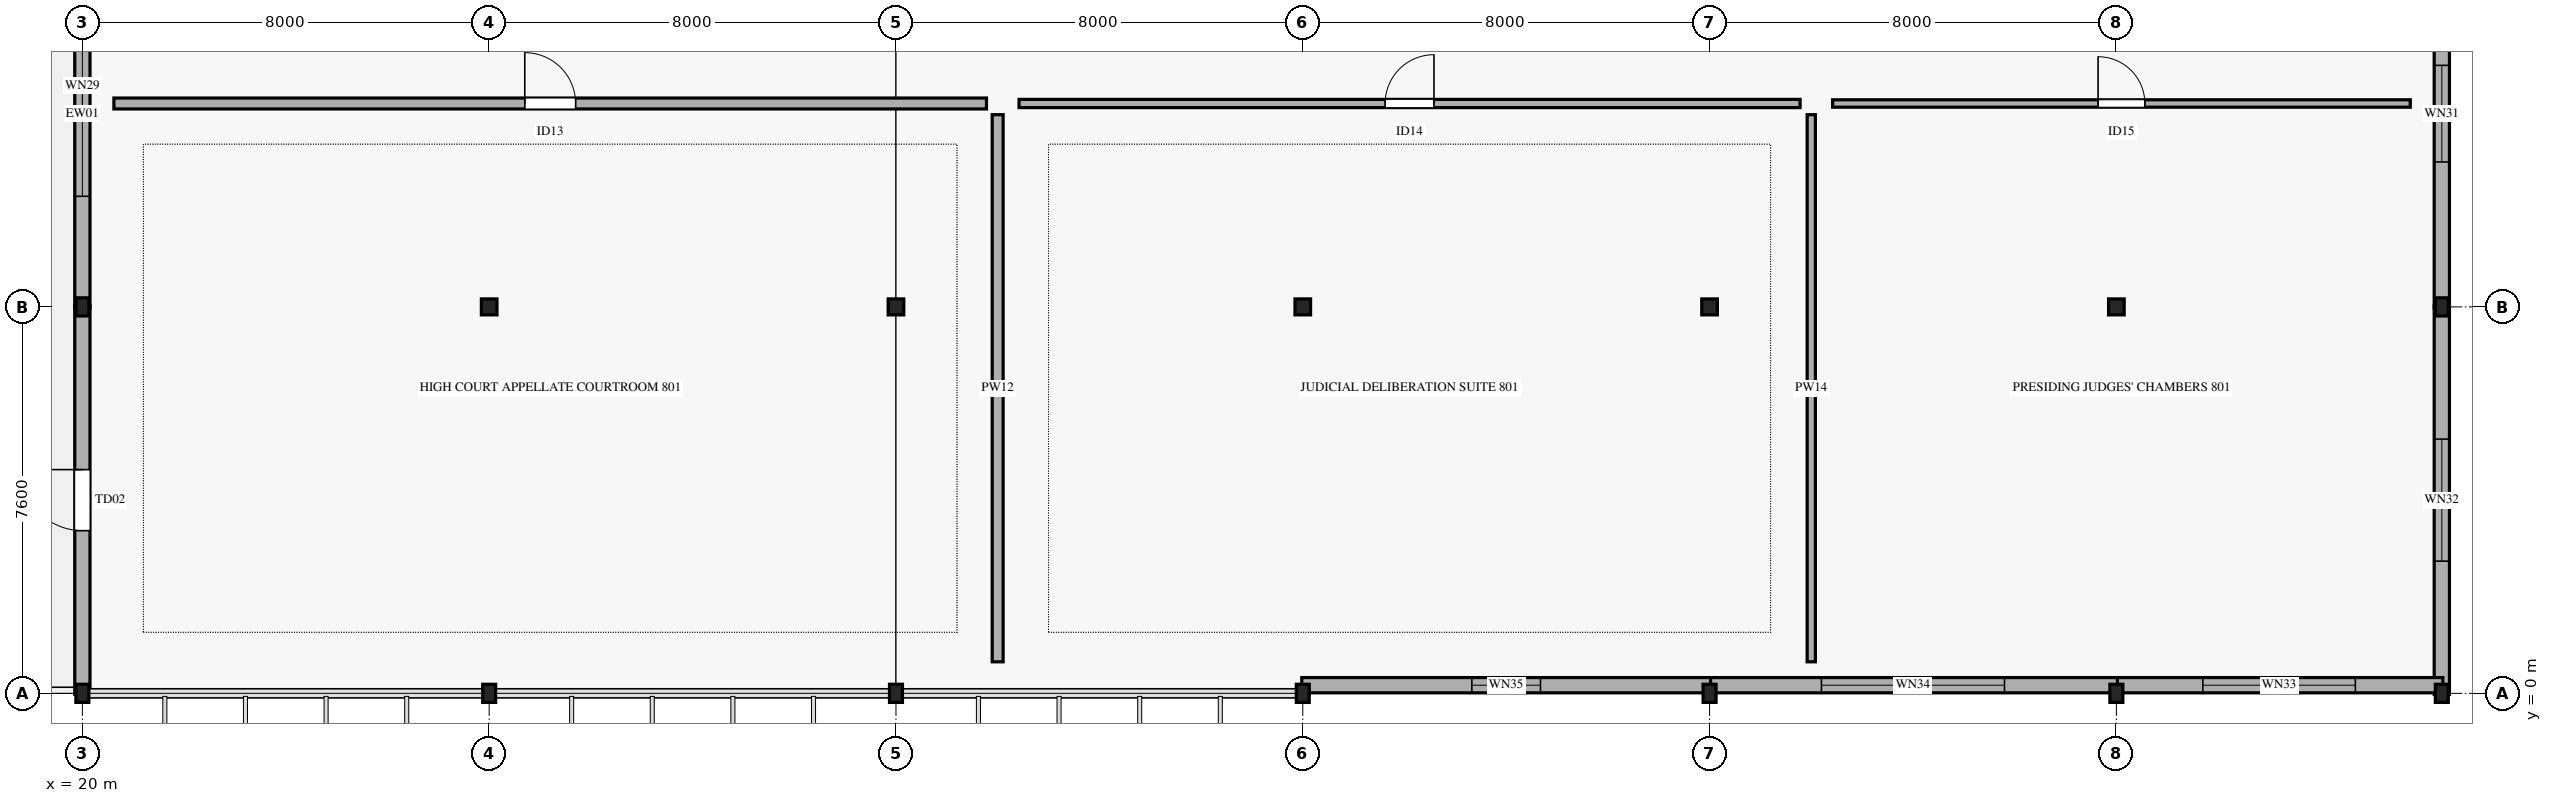
"""IFC4 building model, lengths in metres.
Left out: names, types, materials, properties, quantities, classifications, styles, units other than length and angle.
Written with IfcOpenShell. Run it as: python <this file> out.ifc"""

import sys

from ifc_helpers import new_model, si_unit, direction, frame, frame_2d, origin, origin_2d, place, context, subcontext, project, spatial, rectangle, i_section, extrude, element, fill, save


model = new_model("IFC4")
c1 = context("Model", 3, precision=1e-05, world=origin(), true_north=direction((0.0, 1.0)))
c2 = subcontext(c1, "Body", "Model", "MODEL_VIEW")
j1 = project(units=[si_unit("LENGTHUNIT", "METRE"), si_unit("PLANEANGLEUNIT", "RADIAN")], contexts=[c1])
p1 = place(None, origin())
s1 = spatial("IfcSite", under=j1, at=p1, CompositionType="ELEMENT")
p2 = place(p1, origin())
s2 = spatial("IfcBuilding", under=s1, at=p2, CompositionType="ELEMENT")
p3 = place(p2, frame((0.0, 0.0, 37.8)))
s3 = spatial("IfcBuildingStorey", under=s2, at=p3, CompositionType="ELEMENT", Elevation=37.8)
for number, where, z_axis, x_axis in (
    (1, (20.0, 0.0, 0.0), (0.0, 0.0, 1.0), (1.0, 0.0, 0.0)),
    (2, (20.0, 7.6, 0.0), (0.0, 0.0, 1.0), (1.0, 0.0, 0.0)),
    (3, (28.0, 0.0, 0.0), (0.0, 0.0, 1.0), (1.0, 0.0, 0.0)),
):
    element("IfcColumn", number, at=place(p3, frame(where, z_axis=z_axis, x_axis=x_axis)), inside=s3, PredefinedType="COLUMN", context=c2, shape_type="SweptSolid", body=[
        extrude(i_section(OverallWidth=0.255, OverallDepth=0.357, WebThickness=0.01, FlangeThickness=0.018, FilletRadius=0.015, at=origin_2d()), origin(), (0.0, 0.0, 1.0), 4.0),
    ])
p4 = place(p3, frame((28.0, 7.6, 0.0), z_axis=(0.0, 0.0, 1.0), x_axis=(1.0, 0.0, 0.0)))
e4 = element("IfcColumn", 4, at=p4, inside=s3, PredefinedType="COLUMN", context=c2, shape_type="SweptSolid", body=[
    extrude(i_section(OverallWidth=0.307, OverallDepth=0.314, WebThickness=0.012, FlangeThickness=0.019, FilletRadius=0.015, at=origin_2d()), origin(), (0.0, 0.0, 1.0), 4.0),
])
p5 = place(p3, frame((36.0, 0.0, 0.0), z_axis=(0.0, 0.0, 1.0), x_axis=(1.0, 0.0, 0.0)))
e5 = element("IfcColumn", 5, at=p5, inside=s3, PredefinedType="COLUMN", context=c2, shape_type="SweptSolid", body=[
    extrude(i_section(OverallWidth=0.255, OverallDepth=0.357, WebThickness=0.01, FlangeThickness=0.018, FilletRadius=0.015, at=origin_2d()), origin(), (0.0, 0.0, 1.0), 4.0),
])
p6 = place(p3, frame((36.0, 7.6, 0.0), z_axis=(0.0, 0.0, 1.0), x_axis=(1.0, 0.0, 0.0)))
e6 = element("IfcColumn", 6, at=p6, inside=s3, PredefinedType="COLUMN", context=c2, shape_type="SweptSolid", body=[
    extrude(i_section(OverallWidth=0.307, OverallDepth=0.314, WebThickness=0.012, FlangeThickness=0.019, FilletRadius=0.015, at=origin_2d()), origin(), (0.0, 0.0, 1.0), 4.0),
])
p7 = place(p3, frame((44.0, 0.0, 0.0), z_axis=(0.0, 0.0, 1.0), x_axis=(1.0, 0.0, 0.0)))
e7 = element("IfcColumn", 7, at=p7, inside=s3, PredefinedType="COLUMN", context=c2, shape_type="SweptSolid", body=[
    extrude(i_section(OverallWidth=0.255, OverallDepth=0.357, WebThickness=0.01, FlangeThickness=0.018, FilletRadius=0.015, at=origin_2d()), origin(), (0.0, 0.0, 1.0), 4.0),
])
p8 = place(p3, frame((44.0, 7.6, 0.0), z_axis=(0.0, 0.0, 1.0), x_axis=(1.0, 0.0, 0.0)))
e8 = element("IfcColumn", 8, at=p8, inside=s3, PredefinedType="COLUMN", context=c2, shape_type="SweptSolid", body=[
    extrude(i_section(OverallWidth=0.307, OverallDepth=0.314, WebThickness=0.012, FlangeThickness=0.019, FilletRadius=0.015, at=origin_2d()), origin(), (0.0, 0.0, 1.0), 4.0),
])
p9 = place(p3, frame((52.0, 0.0, 0.0), z_axis=(0.0, 0.0, 1.0), x_axis=(1.0, 0.0, 0.0)))
e9 = element("IfcColumn", 9, at=p9, inside=s3, PredefinedType="COLUMN", context=c2, shape_type="SweptSolid", body=[
    extrude(i_section(OverallWidth=0.255, OverallDepth=0.357, WebThickness=0.01, FlangeThickness=0.018, FilletRadius=0.015, at=origin_2d()), origin(), (0.0, 0.0, 1.0), 4.0),
])
p10 = place(p3, frame((52.0, 7.6, 0.0), z_axis=(0.0, 0.0, 1.0), x_axis=(1.0, 0.0, 0.0)))
e10 = element("IfcColumn", 10, at=p10, inside=s3, PredefinedType="COLUMN", context=c2, shape_type="SweptSolid", body=[
    extrude(i_section(OverallWidth=0.307, OverallDepth=0.314, WebThickness=0.012, FlangeThickness=0.019, FilletRadius=0.015, at=origin_2d()), origin(), (0.0, 0.0, 1.0), 4.0),
])
p11 = place(p3, frame((60.0, 0.0, 0.0), z_axis=(0.0, 0.0, 1.0), x_axis=(1.0, 0.0, 0.0)))
e11 = element("IfcColumn", 11, at=p11, inside=s3, PredefinedType="COLUMN", context=c2, shape_type="SweptSolid", body=[
    extrude(i_section(OverallWidth=0.255, OverallDepth=0.357, WebThickness=0.01, FlangeThickness=0.018, FilletRadius=0.015, at=origin_2d()), origin(), (0.0, 0.0, 1.0), 4.0),
])
p12 = place(p3, frame((60.0, 7.6, 0.0), z_axis=(0.0, 0.0, 1.0), x_axis=(1.0, 0.0, 0.0)))
e12 = element("IfcColumn", 12, at=p12, inside=s3, PredefinedType="COLUMN", context=c2, shape_type="SweptSolid", body=[
    extrude(i_section(OverallWidth=0.307, OverallDepth=0.314, WebThickness=0.012, FlangeThickness=0.019, FilletRadius=0.015, at=origin_2d()), origin(), (0.0, 0.0, 1.0), 4.0),
])
for number, where, z_axis, x_axis in (
    (13, (66.4, 0.0, 0.0), (0.0, 0.0, 1.0), (1.0, 0.0, 0.0)),
    (14, (66.4, 7.6, 0.0), (0.0, 0.0, 1.0), (1.0, 0.0, 0.0)),
):
    element("IfcColumn", number, at=place(p3, frame(where, z_axis=z_axis, x_axis=x_axis)), inside=s3, PredefinedType="COLUMN", context=c2, shape_type="SweptSolid", body=[
        extrude(i_section(OverallWidth=0.255, OverallDepth=0.357, WebThickness=0.01, FlangeThickness=0.018, FilletRadius=0.015, at=origin_2d()), origin(), (0.0, 0.0, 1.0), 4.0),
    ])
p13 = place(p3, frame((20.0, -0.02, 0.0), z_axis=(0.0, 0.0, 1.0), x_axis=(0.0, 1.0, 0.0)))
e15 = element("IfcWall", 15, at=p13, inside=s3, PredefinedType="STANDARD", context=c2, shape_type="SweptSolid", body=[
    extrude(rectangle(XDim=7.64, YDim=0.3, at=frame_2d((3.82, 0.0))), origin(), (0.0, 0.0, 1.0), 3.06),
])
p14 = place(p13, frame((3.22, 0.0, 0.0)))
e16 = element("IfcOpeningElement", 16, at=p14, cuts=e15, PredefinedType="OPENING", context=c2, shape_type="SweptSolid", body=[
    extrude(rectangle(XDim=1.2, YDim=2.2, at=frame_2d((0.6, 1.1))), frame((0.0, 0.16, 0.0), z_axis=(0.0, -1.0, 0.0), x_axis=(1.0, 0.0, 0.0)), (0.0, 0.0, 1.0), 0.32),
])
p15 = place(p3, frame((20.0, 7.58, 0.0), z_axis=(0.0, 0.0, 1.0), x_axis=(0.0, 1.0, 0.0)))
e17 = element("IfcWall", 17, at=p15, inside=s3, PredefinedType="STANDARD", context=c2, shape_type="SweptSolid", body=[
    extrude(rectangle(XDim=7.64, YDim=0.3, at=frame_2d((3.82, 0.0))), origin(), (0.0, 0.0, 1.0), 3.06),
])
p16 = place(p15, frame((2.195, 0.0, 0.75)))
e18 = element("IfcOpeningElement", 18, at=p16, cuts=e17, PredefinedType="OPENING", context=c2, shape_type="SweptSolid", body=[
    extrude(rectangle(XDim=3.25, YDim=1.55, at=frame_2d((1.625, 0.775))), frame((0.0, 0.16, 0.0), z_axis=(0.0, -1.0, 0.0), x_axis=(1.0, 0.0, 0.0)), (0.0, 0.0, 1.0), 0.32),
])
p17 = place(p3, frame((66.4, 15.22, 0.0), z_axis=(0.0, 0.0, 1.0), x_axis=(0.0, -1.0, 0.0)))
e19 = element("IfcWall", 19, at=p17, inside=s3, PredefinedType="STANDARD", context=c2, shape_type="SweptSolid", body=[
    extrude(rectangle(XDim=7.64, YDim=0.3, at=frame_2d((3.82, 0.0))), origin(), (0.0, 0.0, 1.0), 3.06),
])
p18 = place(p17, frame((2.87, 0.0, 0.75)))
e20 = element("IfcOpeningElement", 20, at=p18, cuts=e19, PredefinedType="OPENING", context=c2, shape_type="SweptSolid", body=[
    extrude(rectangle(XDim=1.9, YDim=1.3, at=frame_2d((0.95, 0.65))), frame((0.0, 0.16, 0.0), z_axis=(0.0, -1.0, 0.0), x_axis=(1.0, 0.0, 0.0)), (0.0, 0.0, 1.0), 0.32),
])
p19 = place(p3, frame((66.4, 7.62, 0.0), z_axis=(0.0, 0.0, 1.0), x_axis=(0.0, -1.0, 0.0)))
e21 = element("IfcWall", 21, at=p19, inside=s3, PredefinedType="STANDARD", context=c2, shape_type="SweptSolid", body=[
    extrude(rectangle(XDim=7.64, YDim=0.3, at=frame_2d((3.82, 0.0))), origin(), (0.0, 0.0, 1.0), 3.06),
])
p20 = place(p19, frame((2.62, 0.0, 0.75)))
e22 = element("IfcOpeningElement", 22, at=p20, cuts=e21, PredefinedType="OPENING", context=c2, shape_type="SweptSolid", body=[
    extrude(rectangle(XDim=2.4, YDim=1.3, at=frame_2d((1.2, 0.65))), frame((0.0, 0.16, 0.0), z_axis=(0.0, -1.0, 0.0), x_axis=(1.0, 0.0, 0.0)), (0.0, 0.0, 1.0), 0.32),
])
p21 = place(p3, frame((66.42, 0.16, 0.0), z_axis=(0.0, 0.0, 1.0), x_axis=(-1.0, 0.0, 0.0)))
e23 = element("IfcWall", 23, at=p21, inside=s3, PredefinedType="STANDARD", context=c2, shape_type="SweptSolid", body=[
    extrude(rectangle(XDim=6.44, YDim=0.3, at=frame_2d((3.22, 0.0))), origin(), (0.0, 0.0, 1.0), 3.06),
])
p22 = place(p21, frame((1.72, 0.0, 0.75)))
e24 = element("IfcOpeningElement", 24, at=p22, cuts=e23, PredefinedType="OPENING", context=c2, shape_type="SweptSolid", body=[
    extrude(rectangle(XDim=3.0, YDim=1.3, at=frame_2d((1.5, 0.65))), frame((0.0, 0.16, 0.0), z_axis=(0.0, -1.0, 0.0), x_axis=(1.0, 0.0, 0.0)), (0.0, 0.0, 1.0), 0.32),
])
p23 = place(p3, frame((60.02, 0.16, 0.0), z_axis=(0.0, 0.0, 1.0), x_axis=(-1.0, 0.0, 0.0)))
e25 = element("IfcWall", 25, at=p23, inside=s3, PredefinedType="STANDARD", context=c2, shape_type="SweptSolid", body=[
    extrude(rectangle(XDim=8.04, YDim=0.3, at=frame_2d((4.02, 0.0))), origin(), (0.0, 0.0, 1.0), 3.06),
])
p24 = place(p23, frame((2.22, 0.0, 0.75)))
e26 = element("IfcOpeningElement", 26, at=p24, cuts=e25, PredefinedType="OPENING", context=c2, shape_type="SweptSolid", body=[
    extrude(rectangle(XDim=3.6, YDim=1.3, at=frame_2d((1.8, 0.65))), frame((0.0, 0.16, 0.0), z_axis=(0.0, -1.0, 0.0), x_axis=(1.0, 0.0, 0.0)), (0.0, 0.0, 1.0), 0.32),
])
p25 = place(p3, frame((52.02, 0.16, 0.0), z_axis=(0.0, 0.0, 1.0), x_axis=(-1.0, 0.0, 0.0)))
e27 = element("IfcWall", 27, at=p25, inside=s3, PredefinedType="STANDARD", context=c2, shape_type="SweptSolid", body=[
    extrude(rectangle(XDim=8.04, YDim=0.3, at=frame_2d((4.02, 0.0))), origin(), (0.0, 0.0, 1.0), 3.06),
])
p26 = place(p25, frame((3.345, 0.0, 0.75)))
e28 = element("IfcOpeningElement", 28, at=p26, cuts=e27, PredefinedType="OPENING", context=c2, shape_type="SweptSolid", body=[
    extrude(rectangle(XDim=1.35, YDim=1.9, at=frame_2d((0.675, 0.95))), frame((0.0, 0.16, 0.0), z_axis=(0.0, -1.0, 0.0), x_axis=(1.0, 0.0, 0.0)), (0.0, 0.0, 1.0), 0.32),
])
p27 = place(p3, frame((20.62, 11.6, 0.0), z_axis=(0.0, 0.0, 1.0), x_axis=(1.0, 0.0, 0.0)))
e29 = element("IfcWall", 29, at=p27, inside=s3, PredefinedType="PARTITIONING", context=c2, shape_type="SweptSolid", body=[
    extrude(rectangle(XDim=17.16, YDim=0.215, at=frame_2d((8.58, 0.0))), origin(), (0.0, 0.0, 1.0), 2.85),
])
p28 = place(p27, frame((8.08, 0.0, 0.0)))
e30 = element("IfcOpeningElement", 30, at=p28, cuts=e29, PredefinedType="OPENING", context=c2, shape_type="SweptSolid", body=[
    extrude(rectangle(XDim=1.0, YDim=2.3, at=frame_2d((0.5, 1.15))), frame((0.0, 0.117, 0.0), z_axis=(0.0, -1.0, 0.0), x_axis=(1.0, 0.0, 0.0)), (0.0, 0.0, 1.0), 0.235),
])
p29 = place(p3, frame((38.0, 0.62, 0.0), z_axis=(0.0, 0.0, 1.0), x_axis=(0.0, 1.0, 0.0)))
e31 = element("IfcWall", 31, at=p29, inside=s3, PredefinedType="PARTITIONING", context=c2, shape_type="SweptSolid", body=[
    extrude(rectangle(XDim=10.76, YDim=0.215, at=frame_2d((5.38, 0.0))), origin(), (0.0, 0.0, 1.0), 2.85),
])
p30 = place(p3, frame((38.42, 11.6, 0.0), z_axis=(0.0, 0.0, 1.0), x_axis=(1.0, 0.0, 0.0)))
e32 = element("IfcWall", 32, at=p30, inside=s3, PredefinedType="PARTITIONING", context=c2, shape_type="SweptSolid", body=[
    extrude(rectangle(XDim=15.36, YDim=0.162, at=frame_2d((7.68, 0.0))), origin(), (0.0, 0.0, 1.0), 2.85),
])
p31 = place(p30, frame((7.2, 0.0, 0.0)))
e33 = element("IfcOpeningElement", 33, at=p31, cuts=e32, PredefinedType="OPENING", context=c2, shape_type="SweptSolid", body=[
    extrude(rectangle(XDim=0.96, YDim=2.25, at=frame_2d((0.48, 1.125))), frame((0.0, 0.091, 0.0), z_axis=(0.0, -1.0, 0.0), x_axis=(1.0, 0.0, 0.0)), (0.0, 0.0, 1.0), 0.182),
])
p32 = place(p3, frame((54.0, 0.62, 0.0), z_axis=(0.0, 0.0, 1.0), x_axis=(0.0, 1.0, 0.0)))
e34 = element("IfcWall", 34, at=p32, inside=s3, PredefinedType="PARTITIONING", context=c2, shape_type="SweptSolid", body=[
    extrude(rectangle(XDim=10.76, YDim=0.162, at=frame_2d((5.38, 0.0))), origin(), (0.0, 0.0, 1.0), 2.85),
])
p33 = place(p3, frame((54.42, 11.6, 0.0), z_axis=(0.0, 0.0, 1.0), x_axis=(1.0, 0.0, 0.0)))
e35 = element("IfcWall", 35, at=p33, inside=s3, PredefinedType="PARTITIONING", context=c2, shape_type="SweptSolid", body=[
    extrude(rectangle(XDim=11.36, YDim=0.146, at=frame_2d((5.68, 0.0))), origin(), (0.0, 0.0, 1.0), 2.85),
])
p34 = place(p33, frame((5.22, 0.0, 0.0)))
e36 = element("IfcOpeningElement", 36, at=p34, cuts=e35, PredefinedType="OPENING", context=c2, shape_type="SweptSolid", body=[
    extrude(rectangle(XDim=0.92, YDim=2.2, at=frame_2d((0.46, 1.1))), frame((0.0, 0.083, 0.0), z_axis=(0.0, -1.0, 0.0), x_axis=(1.0, 0.0, 0.0)), (0.0, 0.0, 1.0), 0.166),
])
p35 = place(p14, origin())
e37 = element("IfcDoor", 37, at=p35, inside=s3, OperationType="SINGLE_SWING_RIGHT", PredefinedType="DOOR", context=c2, shape_type="SweptSolid", body=[
    extrude(rectangle(XDim=1.2, YDim=2.2, at=frame_2d((0.6, 1.1))), frame((0.0, 0.025, 0.0), z_axis=(0.0, -1.0, 0.0), x_axis=(1.0, 0.0, 0.0)), (0.0, 0.0, 1.0), 0.05),
])
fill(e16, e37)
p36 = place(p16, origin())
e38 = element("IfcWindow", 38, at=p36, inside=s3, PartitioningType="SINGLE_PANEL", PredefinedType="WINDOW", context=c2, shape_type="SweptSolid", body=[
    extrude(rectangle(XDim=3.25, YDim=1.55, at=frame_2d((1.625, 0.775))), frame((0.0, 0.03, 0.0), z_axis=(0.0, -1.0, 0.0), x_axis=(1.0, 0.0, 0.0)), (0.0, 0.0, 1.0), 0.06),
])
fill(e18, e38)
p37 = place(p18, origin())
e39 = element("IfcWindow", 39, at=p37, inside=s3, PartitioningType="SINGLE_PANEL", PredefinedType="WINDOW", context=c2, shape_type="SweptSolid", body=[
    extrude(rectangle(XDim=1.9, YDim=1.3, at=frame_2d((0.95, 0.65))), frame((0.0, 0.03, 0.0), z_axis=(0.0, -1.0, 0.0), x_axis=(1.0, 0.0, 0.0)), (0.0, 0.0, 1.0), 0.06),
])
fill(e20, e39)
p38 = place(p20, origin())
e40 = element("IfcWindow", 40, at=p38, inside=s3, PartitioningType="SINGLE_PANEL", PredefinedType="WINDOW", context=c2, shape_type="SweptSolid", body=[
    extrude(rectangle(XDim=2.4, YDim=1.3, at=frame_2d((1.2, 0.65))), frame((0.0, 0.03, 0.0), z_axis=(0.0, -1.0, 0.0), x_axis=(1.0, 0.0, 0.0)), (0.0, 0.0, 1.0), 0.06),
])
fill(e22, e40)
p39 = place(p22, origin())
e41 = element("IfcWindow", 41, at=p39, inside=s3, PartitioningType="SINGLE_PANEL", PredefinedType="WINDOW", context=c2, shape_type="SweptSolid", body=[
    extrude(rectangle(XDim=3.0, YDim=1.3, at=frame_2d((1.5, 0.65))), frame((0.0, 0.03, 0.0), z_axis=(0.0, -1.0, 0.0), x_axis=(1.0, 0.0, 0.0)), (0.0, 0.0, 1.0), 0.06),
])
fill(e24, e41)
p40 = place(p24, origin())
e42 = element("IfcWindow", 42, at=p40, inside=s3, PartitioningType="SINGLE_PANEL", PredefinedType="WINDOW", context=c2, shape_type="SweptSolid", body=[
    extrude(rectangle(XDim=3.6, YDim=1.3, at=frame_2d((1.8, 0.65))), frame((0.0, 0.03, 0.0), z_axis=(0.0, -1.0, 0.0), x_axis=(1.0, 0.0, 0.0)), (0.0, 0.0, 1.0), 0.06),
])
fill(e26, e42)
p41 = place(p26, origin())
e43 = element("IfcWindow", 43, at=p41, inside=s3, PartitioningType="SINGLE_PANEL", PredefinedType="WINDOW", context=c2, shape_type="SweptSolid", body=[
    extrude(rectangle(XDim=1.35, YDim=1.9, at=frame_2d((0.675, 0.95))), frame((0.0, 0.03, 0.0), z_axis=(0.0, -1.0, 0.0), x_axis=(1.0, 0.0, 0.0)), (0.0, 0.0, 1.0), 0.06),
])
fill(e28, e43)
p42 = place(p28, origin())
e44 = element("IfcDoor", 44, at=p42, inside=s3, OperationType="SINGLE_SWING_LEFT", PredefinedType="DOOR", context=c2, shape_type="SweptSolid", body=[
    extrude(rectangle(XDim=1.0, YDim=2.3, at=frame_2d((0.5, 1.15))), frame((0.0, 0.025, 0.0), z_axis=(0.0, -1.0, 0.0), x_axis=(1.0, 0.0, 0.0)), (0.0, 0.0, 1.0), 0.05),
])
fill(e30, e44)
p43 = place(p31, origin())
e45 = element("IfcDoor", 45, at=p43, inside=s3, OperationType="SINGLE_SWING_RIGHT", PredefinedType="DOOR", context=c2, shape_type="SweptSolid", body=[
    extrude(rectangle(XDim=0.96, YDim=2.25, at=frame_2d((0.48, 1.125))), frame((0.0, 0.025, 0.0), z_axis=(0.0, -1.0, 0.0), x_axis=(1.0, 0.0, 0.0)), (0.0, 0.0, 1.0), 0.05),
])
fill(e33, e45)
p44 = place(p34, origin())
e46 = element("IfcDoor", 46, at=p44, inside=s3, OperationType="SINGLE_SWING_LEFT", PredefinedType="DOOR", context=c2, shape_type="SweptSolid", body=[
    extrude(rectangle(XDim=0.92, YDim=2.2, at=frame_2d((0.46, 1.1))), frame((0.0, 0.025, 0.0), z_axis=(0.0, -1.0, 0.0), x_axis=(1.0, 0.0, 0.0)), (0.0, 0.0, 1.0), 0.05),
])
fill(e36, e46)
save(model, sys.argv[1])
